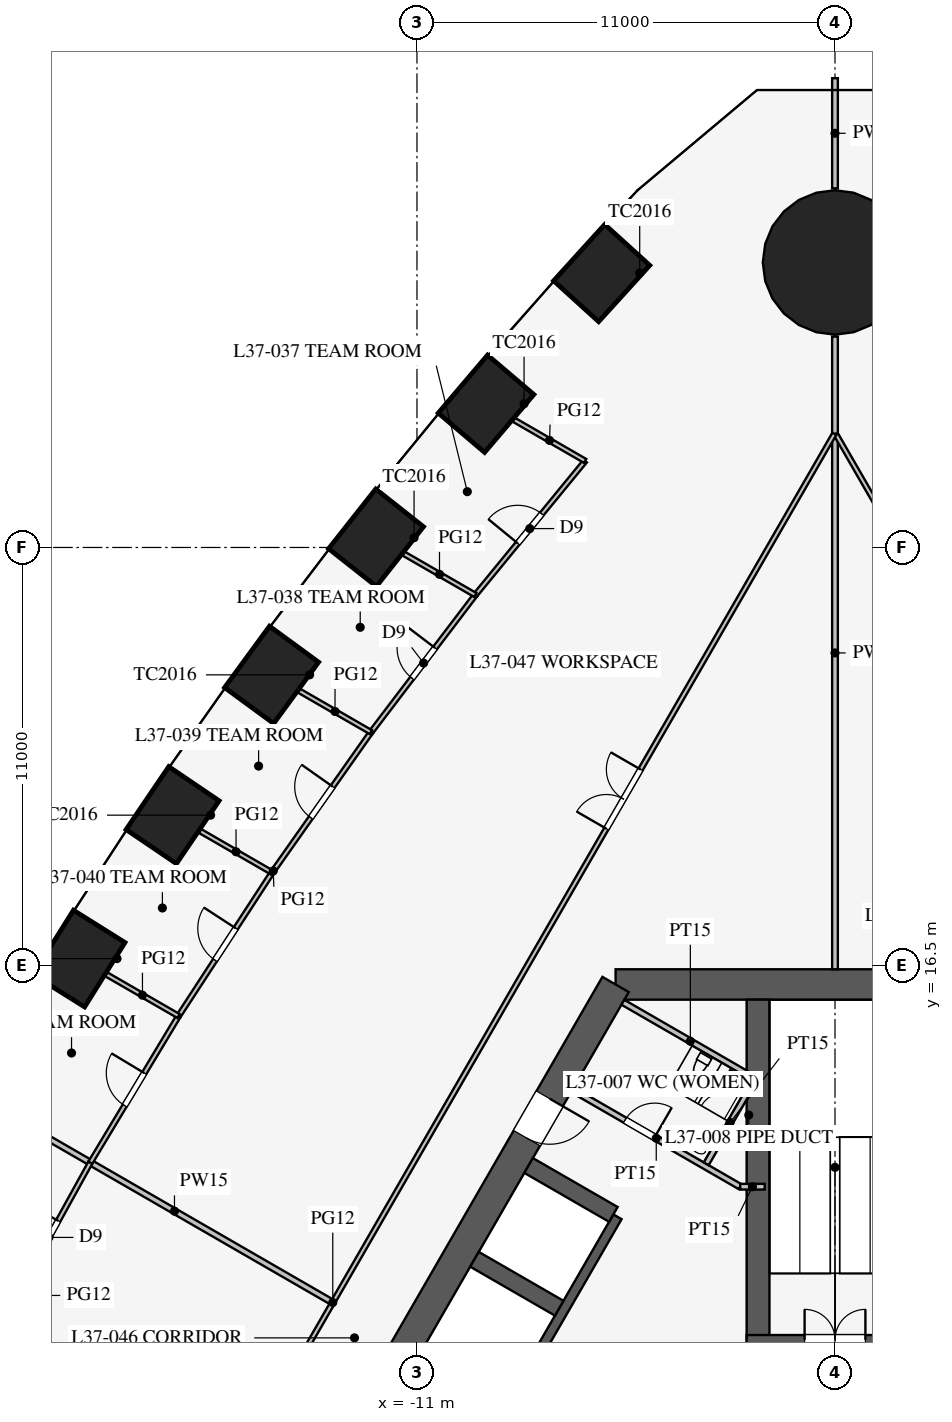
"""IFC4 building model, lengths in metres.
Left out: names, types, materials, properties, quantities, classifications, styles, units other than length and angle.
Written with IfcOpenShell. Run it as: python <this file> out.ifc"""

import sys

from ifc_helpers import new_model, si_unit, direction, frame, frame_2d, origin, origin_2d, place, context, subcontext, project, spatial, rectangle, circle, extrude, element, fill, save


model = new_model("IFC4")
c1 = context("Model", 3, precision=1e-05, world=origin(), true_north=direction((0.0, 1.0)))
c2 = subcontext(c1, "Body", "Model", "MODEL_VIEW")
j1 = project(units=[si_unit("LENGTHUNIT", "METRE"), si_unit("PLANEANGLEUNIT", "RADIAN")], contexts=[c1])
p1 = place(None, origin())
s1 = spatial("IfcSite", under=j1, at=p1, CompositionType="ELEMENT")
p2 = place(p1, origin())
s2 = spatial("IfcBuilding", under=s1, at=p2, CompositionType="ELEMENT")
p3 = place(p2, frame((0.0, 0.0, 161.9)))
s3 = spatial("IfcBuildingStorey", under=s2, at=p3, CompositionType="ELEMENT", Elevation=161.9)
for number, where, z_axis, x_axis in (
    (1, (-6.139, 34.721, 0.0), (0.0, 0.0, 1.0), (-0.672, -0.74, 0.0)),
    (2, (-9.182, 31.282, 0.0), (0.0, 0.0, 1.0), (-0.648, -0.762, 0.0)),
    (3, (-12.077, 27.757, 0.0), (0.0, 0.0, 1.0), (-0.62, -0.785, 0.0)),
    (4, (-14.825, 24.148, 0.0), (0.0, 0.0, 1.0), (-0.591, -0.807, 0.0)),
    (5, (-17.43, 20.456, 0.0), (0.0, 0.0, 1.0), (-0.561, -0.828, 0.0)),
    (6, (-19.893, 16.681, 0.0), (0.0, 0.0, 1.0), (-0.531, -0.847, 0.0)),
):
    element("IfcColumn", number, at=place(p3, frame(where, z_axis=z_axis, x_axis=x_axis)), inside=s3, PredefinedType="COLUMN", context=c2, shape_type="SweptSolid", body=[
        extrude(rectangle(XDim=2.0, YDim=1.6, at=origin_2d()), origin(), (0.0, 0.0, 1.0), 4.2),
    ])
p4 = place(p3, frame((0.0, 35.0, 0.0), z_axis=(0.0, 0.0, 1.0), x_axis=(1.0, 0.0, 0.0)))
e7 = element("IfcColumn", 7, at=p4, inside=s3, PredefinedType="COLUMN", context=c2, shape_type="SweptSolid", body=[
    extrude(circle(Radius=1.9, at=origin_2d()), origin(), (0.0, 0.0, 1.0), 4.2),
])
p5 = place(p3, frame((5.773, 16.0, 0.0), z_axis=(0.0, 0.0, 1.0), x_axis=(-1.0, 0.0, 0.0)))
e8 = element("IfcWall", 8, at=p5, inside=s3, PredefinedType="SHEAR", context=c2, shape_type="SweptSolid", body=[
    extrude(rectangle(XDim=11.547, YDim=0.8, at=frame_2d((5.773, 0.0))), origin(), (0.0, 0.0, 1.0), 4.2),
])
p6 = place(p3, frame((-5.773, 16.0, 0.0), z_axis=(0.0, 0.0, 1.0), x_axis=(-0.500002442456, -0.866023993627, 0.0)))
e9 = element("IfcWall", 9, at=p6, inside=s3, PredefinedType="SHEAR", context=c2, shape_type="SweptSolid", body=[
    extrude(rectangle(XDim=21.939, YDim=0.8, at=frame_2d((10.97, 0.0))), origin(), (0.0, 0.0, 1.0), 4.2),
])
p7 = place(p6, frame((17.27, 0.0, 0.0)))
e10 = element("IfcOpeningElement", 10, at=p7, cuts=e9, PredefinedType="OPENING", context=c2, shape_type="SweptSolid", body=[
    extrude(rectangle(XDim=1.2, YDim=2.1, at=frame_2d((0.6, 1.05))), frame((0.0, 0.41, 0.0), z_axis=(0.0, -1.0, 0.0), x_axis=(1.0, 0.0, 0.0)), (0.0, 0.0, 1.0), 0.82),
])
p8 = place(p6, frame((3.47, 0.0, 0.0)))
e11 = element("IfcOpeningElement", 11, at=p8, cuts=e9, PredefinedType="OPENING", context=c2, shape_type="SweptSolid", body=[
    extrude(rectangle(XDim=1.2, YDim=2.1, at=frame_2d((0.6, 1.05))), frame((0.0, 0.41, 0.0), z_axis=(0.0, -1.0, 0.0), x_axis=(1.0, 0.0, 0.0)), (0.0, 0.0, 1.0), 0.82),
])
p9 = place(p3, frame((-5.724, 9.886, 0.0), z_axis=(0.0, 0.0, 1.0), x_axis=(-0.500001763848, -0.866024385424, 0.0)))
e12 = element("IfcWall", 12, at=p9, inside=s3, PredefinedType="SHEAR", context=c2, shape_type="SweptSolid", body=[
    extrude(rectangle(XDim=11.4, YDim=0.25, at=frame_2d((5.7, 0.0))), origin(), (0.0, 0.0, 1.0), 4.2),
])
p10 = place(p9, frame((6.525, 0.0, 0.0)))
e13 = element("IfcOpeningElement", 13, at=p10, cuts=e12, PredefinedType="OPENING", context=c2, shape_type="SweptSolid", body=[
    extrude(rectangle(XDim=1.2, YDim=2.2, at=frame_2d((0.6, 1.1))), frame((0.0, 0.135, 0.0), z_axis=(0.0, -1.0, 0.0), x_axis=(1.0, 0.0, 0.0)), (0.0, 0.0, 1.0), 0.27),
])
p11 = place(p9, frame((9.375, 0.0, 0.0)))
e14 = element("IfcOpeningElement", 14, at=p11, cuts=e12, PredefinedType="OPENING", context=c2, shape_type="SweptSolid", body=[
    extrude(rectangle(XDim=1.2, YDim=2.2, at=frame_2d((0.6, 1.1))), frame((0.0, 0.135, 0.0), z_axis=(0.0, -1.0, 0.0), x_axis=(1.0, 0.0, 0.0)), (0.0, 0.0, 1.0), 0.27),
])
p12 = place(p3, frame((-5.832, 9.949, 0.0), z_axis=(0.0, 0.0, 1.0), x_axis=(-0.866029291668, 0.499993265928, 0.0)))
e15 = element("IfcWall", 15, at=p12, inside=s3, PredefinedType="SHEAR", context=c2, shape_type="SweptSolid", body=[
    extrude(rectangle(XDim=2.575, YDim=0.45, at=frame_2d((1.288, 0.0))), origin(), (0.0, 0.0, 1.0), 4.2),
])
p13 = place(p3, frame((-7.257, 7.481, 0.0), z_axis=(0.0, 0.0, 1.0), x_axis=(-0.866046643894, 0.499963209246, 0.0)))
e16 = element("IfcWall", 16, at=p13, inside=s3, PredefinedType="SHEAR", context=c2, shape_type="SweptSolid", body=[
    extrude(rectangle(XDim=2.575, YDim=0.45, at=frame_2d((1.288, 0.0))), origin(), (0.0, 0.0, 1.0), 4.2),
])
p14 = place(p3, frame((-2.025, 6.525, 0.0), z_axis=(0.0, 0.0, 1.0), x_axis=(0.0, 1.0, 0.0)))
e17 = element("IfcWall", 17, at=p14, inside=s3, PredefinedType="SHEAR", context=c2, shape_type="SweptSolid", body=[
    extrude(rectangle(XDim=9.075, YDim=0.6, at=frame_2d((4.538, 0.0))), origin(), (0.0, 0.0, 1.0), 4.2),
])
p15 = place(p3, frame((2.325, 6.65, 0.0), z_axis=(0.0, 0.0, 1.0), x_axis=(-1.0, 0.0, 0.0)))
e18 = element("IfcWall", 18, at=p15, inside=s3, PredefinedType="SHEAR", context=c2, shape_type="SweptSolid", body=[
    extrude(rectangle(XDim=4.65, YDim=0.25, at=frame_2d((2.325, 0.0))), origin(), (0.0, 0.0, 1.0), 4.2),
])
p16 = place(p15, frame((1.525, 0.0, 0.0)))
e19 = element("IfcOpeningElement", 19, at=p16, cuts=e18, PredefinedType="OPENING", context=c2, shape_type="SweptSolid", body=[
    extrude(rectangle(XDim=1.6, YDim=2.1, at=frame_2d((0.8, 1.05))), frame((0.0, 0.135, 0.0), z_axis=(0.0, -1.0, 0.0), x_axis=(1.0, 0.0, 0.0)), (0.0, 0.0, 1.0), 0.27),
])
p17 = place(p3, frame((-2.495, 10.678, 0.0), z_axis=(0.0, 0.0, 1.0), x_axis=(-0.86602216432, 0.500005610874, 0.0)))
e20 = element("IfcWall", 20, at=p17, inside=s3, PredefinedType="PARTITIONING", context=c2, shape_type="SweptSolid", body=[
    extrude(rectangle(XDim=5.1, YDim=0.15, at=frame_2d((2.55, 0.0))), origin(), (0.0, 0.0, 1.0), 4.0),
])
p18 = place(p17, frame((2.6, 0.0, 0.0)))
e21 = element("IfcOpeningElement", 21, at=p18, cuts=e20, PredefinedType="OPENING", context=c2, shape_type="SweptSolid", body=[
    extrude(rectangle(XDim=0.9, YDim=2.1, at=frame_2d((0.45, 1.05))), frame((0.0, 0.085, 0.0), z_axis=(0.0, -1.0, 0.0), x_axis=(1.0, 0.0, 0.0)), (0.0, 0.0, 1.0), 0.17),
])
p19 = place(p3, frame((-2.495, 10.678, 0.0), z_axis=(0.0, 0.0, 1.0), x_axis=(1.0, 0.0, 0.0)))
e22 = element("IfcWall", 22, at=p19, inside=s3, PredefinedType="PARTITIONING", context=c2, shape_type="SweptSolid", body=[
    extrude(rectangle(XDim=0.645, YDim=0.15, at=frame_2d((0.323, 0.0))), origin(), (0.0, 0.0, 1.0), 4.0),
])
p20 = place(p3, frame((-2.031, 13.482, 0.0), z_axis=(0.0, 0.0, 1.0), x_axis=(-0.866050731258, 0.499956128963, 0.0)))
e23 = element("IfcWall", 23, at=p20, inside=s3, PredefinedType="PARTITIONING", context=c2, shape_type="SweptSolid", body=[
    extrude(rectangle(XDim=4.1, YDim=0.15, at=frame_2d((2.05, 0.0))), origin(), (0.0, 0.0, 1.0), 4.0),
])
p21 = place(p3, frame((-3.389, 11.281, 0.0), z_axis=(0.0, 0.0, 1.0), x_axis=(0.499989096993, 0.866031698547, 0.0)))
e24 = element("IfcWall", 24, at=p21, inside=s3, PredefinedType="PARTITIONING", context=c2, shape_type="SweptSolid", body=[
    extrude(rectangle(XDim=2.51, YDim=0.15, at=frame_2d((1.255, 0.0))), origin(), (0.0, 0.0, 1.0), 4.0),
])
p22 = place(p3, frame((0.0, 16.4, 0.0), z_axis=(0.0, 0.0, 1.0), x_axis=(0.0, 1.0, 0.0)))
e25 = element("IfcWall", 25, at=p22, inside=s3, PredefinedType="PARTITIONING", context=c2, shape_type="SweptSolid", body=[
    extrude(rectangle(XDim=16.65, YDim=0.15, at=frame_2d((8.325, 0.0))), origin(), (0.0, 0.0, 1.0), 2.3),
])
p23 = place(p3, frame((0.0, 36.95, 0.0), z_axis=(0.0, 0.0, 1.0), x_axis=(0.0, 1.0, 0.0)))
e26 = element("IfcWall", 26, at=p23, inside=s3, PredefinedType="PARTITIONING", context=c2, shape_type="SweptSolid", body=[
    extrude(rectangle(XDim=2.899, YDim=0.15, at=frame_2d((1.45, 0.0))), origin(), (0.0, 0.0, 1.0), 2.3),
])
p24 = place(p3, frame((26.415, -15.231, 0.0), z_axis=(0.0, 0.0, 1.0), x_axis=(-0.50000091641, 0.866024874695, 0.0)))
e27 = element("IfcWall", 27, at=p24, inside=s3, PredefinedType="PARTITIONING", context=c2, shape_type="SweptSolid", body=[
    extrude(rectangle(XDim=52.796, YDim=0.12, at=frame_2d((26.398, 0.0))), origin(), (0.0, 0.0, 1.0), 2.9),
])
p25 = place(p24, frame((10.2, 0.0, 0.15)))
e28 = element("IfcOpeningElement", 28, at=p25, cuts=e27, PredefinedType="OPENING", context=c2, shape_type="SweptSolid", body=[
    extrude(rectangle(XDim=1.8, YDim=2.1, at=frame_2d((0.9, 1.05))), frame((0.0, 0.07, 0.0), z_axis=(0.0, -1.0, 0.0), x_axis=(1.0, 0.0, 0.0)), (0.0, 0.0, 1.0), 0.14),
])
p26 = place(p24, frame((40.8, 0.0, 0.15)))
e29 = element("IfcOpeningElement", 29, at=p26, cuts=e27, PredefinedType="OPENING", context=c2, shape_type="SweptSolid", body=[
    extrude(rectangle(XDim=1.8, YDim=2.1, at=frame_2d((0.9, 1.05))), frame((0.0, 0.07, 0.0), z_axis=(0.0, -1.0, 0.0), x_axis=(1.0, 0.0, 0.0)), (0.0, 0.0, 1.0), 0.14),
])
p27 = place(p3, frame((-13.268, 7.66, 0.0), z_axis=(0.0, 0.0, 1.0), x_axis=(-0.866013963754, 0.500019814191, 0.0)))
e30 = element("IfcWall", 30, at=p27, inside=s3, PredefinedType="PARTITIONING", context=c2, shape_type="SweptSolid", body=[
    extrude(rectangle(XDim=9.5, YDim=0.15, at=frame_2d((4.75, 0.0))), origin(), (0.0, 0.0, 1.0), 2.8),
])
p28 = place(p3, frame((-0.016, 30.491, 0.0), z_axis=(0.0, 0.0, 1.0), x_axis=(-0.50000091641, -0.866024874695, 0.0)))
e31 = element("IfcWall", 31, at=p28, inside=s3, PredefinedType="PARTITIONING", context=c2, shape_type="SweptSolid", body=[
    extrude(rectangle(XDim=52.796, YDim=0.12, at=frame_2d((26.398, 0.0))), origin(), (0.0, 0.0, 1.0), 2.9),
])
p29 = place(p28, frame((10.2, 0.0, 0.15)))
e32 = element("IfcOpeningElement", 32, at=p29, cuts=e31, PredefinedType="OPENING", context=c2, shape_type="SweptSolid", body=[
    extrude(rectangle(XDim=1.8, YDim=2.1, at=frame_2d((0.9, 1.05))), frame((0.0, 0.07, 0.0), z_axis=(0.0, -1.0, 0.0), x_axis=(1.0, 0.0, 0.0)), (0.0, 0.0, 1.0), 0.14),
])
p30 = place(p28, frame((40.8, 0.0, 0.15)))
e33 = element("IfcOpeningElement", 33, at=p30, cuts=e31, PredefinedType="OPENING", context=c2, shape_type="SweptSolid", body=[
    extrude(rectangle(XDim=1.8, YDim=2.1, at=frame_2d((0.9, 1.05))), frame((0.0, 0.07, 0.0), z_axis=(0.0, -1.0, 0.0), x_axis=(1.0, 0.0, 0.0)), (0.0, 0.0, 1.0), 0.14),
])
p31 = place(p3, frame((-19.594, 11.312, 0.0), z_axis=(0.0, 0.0, 1.0), x_axis=(-0.484315883017, -0.87489320803, 0.0)))
e34 = element("IfcWall", 34, at=p31, inside=s3, PredefinedType="PARTITIONING", context=c2, shape_type="SweptSolid", body=[
    extrude(rectangle(XDim=4.5, YDim=0.12, at=frame_2d((2.25, 0.0))), origin(), (0.0, 0.0, 1.0), 2.9),
])
p32 = place(p31, frame((1.75, 0.0, 0.15)))
e35 = element("IfcOpeningElement", 35, at=p32, cuts=e34, PredefinedType="OPENING", context=c2, shape_type="SweptSolid", body=[
    extrude(rectangle(XDim=1.0, YDim=2.1, at=frame_2d((0.5, 1.05))), frame((0.0, 0.07, 0.0), z_axis=(0.0, -1.0, 0.0), x_axis=(1.0, 0.0, 0.0)), (0.0, 0.0, 1.0), 0.14),
])
p33 = place(p3, frame((-12.21, 22.638, 0.0), z_axis=(0.0, 0.0, 1.0), x_axis=(-0.575987178736, -0.817458726745, 0.0)))
e36 = element("IfcWall", 36, at=p33, inside=s3, PredefinedType="PARTITIONING", context=c2, shape_type="SweptSolid", body=[
    extrude(rectangle(XDim=4.518, YDim=0.12, at=frame_2d((2.259, 0.0))), origin(), (0.0, 0.0, 1.0), 2.9),
])
p34 = place(p33, frame((1.75, 0.0, 0.15)))
e37 = element("IfcOpeningElement", 37, at=p34, cuts=e36, PredefinedType="OPENING", context=c2, shape_type="SweptSolid", body=[
    extrude(rectangle(XDim=1.0, YDim=2.1, at=frame_2d((0.5, 1.05))), frame((0.0, 0.07, 0.0), z_axis=(0.0, -1.0, 0.0), x_axis=(1.0, 0.0, 0.0)), (0.0, 0.0, 1.0), 0.14),
])
p35 = place(p3, frame((-9.464, 26.249, 0.0), z_axis=(0.0, 0.0, 1.0), x_axis=(-0.605248368565, -0.796036690329, 0.0)))
e38 = element("IfcWall", 38, at=p35, inside=s3, PredefinedType="PARTITIONING", context=c2, shape_type="SweptSolid", body=[
    extrude(rectangle(XDim=4.536, YDim=0.12, at=frame_2d((2.268, 0.0))), origin(), (0.0, 0.0, 1.0), 2.9),
])
p36 = place(p35, frame((1.75, 0.0, 0.15)))
e39 = element("IfcOpeningElement", 39, at=p36, cuts=e38, PredefinedType="OPENING", context=c2, shape_type="SweptSolid", body=[
    extrude(rectangle(XDim=1.0, YDim=2.1, at=frame_2d((0.5, 1.05))), frame((0.0, 0.07, 0.0), z_axis=(0.0, -1.0, 0.0), x_axis=(1.0, 0.0, 0.0)), (0.0, 0.0, 1.0), 0.14),
])
p37 = place(p3, frame((-6.573, 29.776, 0.0), z_axis=(0.0, 0.0, 1.0), x_axis=(-0.633843962561, -0.773460943503, 0.0)))
e40 = element("IfcWall", 40, at=p37, inside=s3, PredefinedType="PARTITIONING", context=c2, shape_type="SweptSolid", body=[
    extrude(rectangle(XDim=4.561, YDim=0.12, at=frame_2d((2.28, 0.0))), origin(), (0.0, 0.0, 1.0), 2.9),
])
p38 = place(p37, frame((1.8, 0.0, 0.15)))
e41 = element("IfcOpeningElement", 41, at=p38, cuts=e40, PredefinedType="OPENING", context=c2, shape_type="SweptSolid", body=[
    extrude(rectangle(XDim=1.0, YDim=2.1, at=frame_2d((0.5, 1.05))), frame((0.0, 0.07, 0.0), z_axis=(0.0, -1.0, 0.0), x_axis=(1.0, 0.0, 0.0)), (0.0, 0.0, 1.0), 0.14),
])
p39 = place(p3, frame((-17.273, 15.169, 0.0), z_axis=(0.0, 0.0, 1.0), x_axis=(-0.515524404457, -0.856874896592, 0.0)))
e42 = element("IfcWall", 42, at=p39, inside=s3, PredefinedType="PARTITIONING", context=c2, shape_type="SweptSolid", body=[
    extrude(rectangle(XDim=4.501, YDim=0.12, at=frame_2d((2.25, 0.0))), origin(), (0.0, 0.0, 1.0), 2.9),
])
p40 = place(p39, frame((1.75, 0.0, 0.15)))
e43 = element("IfcOpeningElement", 43, at=p40, cuts=e42, PredefinedType="OPENING", context=c2, shape_type="SweptSolid", body=[
    extrude(rectangle(XDim=1.0, YDim=2.1, at=frame_2d((0.5, 1.05))), frame((0.0, 0.07, 0.0), z_axis=(0.0, -1.0, 0.0), x_axis=(1.0, 0.0, 0.0)), (0.0, 0.0, 1.0), 0.14),
])
p41 = place(p3, frame((-14.812, 18.944, 0.0), z_axis=(0.0, 0.0, 1.0), x_axis=(-0.546094247499, -0.837723744948, 0.0)))
e44 = element("IfcWall", 44, at=p41, inside=s3, PredefinedType="PARTITIONING", context=c2, shape_type="SweptSolid", body=[
    extrude(rectangle(XDim=4.506, YDim=0.12, at=frame_2d((2.253, 0.0))), origin(), (0.0, 0.0, 1.0), 2.9),
])
p42 = place(p41, frame((1.75, 0.0, 0.15)))
e45 = element("IfcOpeningElement", 45, at=p42, cuts=e44, PredefinedType="OPENING", context=c2, shape_type="SweptSolid", body=[
    extrude(rectangle(XDim=1.0, YDim=2.1, at=frame_2d((0.5, 1.05))), frame((0.0, 0.07, 0.0), z_axis=(0.0, -1.0, 0.0), x_axis=(1.0, 0.0, 0.0)), (0.0, 0.0, 1.0), 0.14),
])
p43 = place(p3, frame((-12.21, 22.638, 0.0), z_axis=(0.0, 0.0, 1.0), x_axis=(-0.866006986733, 0.500031897912, 0.0)))
e46 = element("IfcWall", 46, at=p43, inside=s3, PredefinedType="PARTITIONING", context=c2, shape_type="SweptSolid", body=[
    extrude(rectangle(XDim=2.185, YDim=0.12, at=frame_2d((1.093, 0.0))), origin(), (0.0, 0.0, 1.0), 2.6),
])
p44 = place(p3, frame((-9.464, 26.249, 0.0), z_axis=(0.0, 0.0, 1.0), x_axis=(-0.866054922749, 0.499948868167, 0.0)))
e47 = element("IfcWall", 47, at=p44, inside=s3, PredefinedType="PARTITIONING", context=c2, shape_type="SweptSolid", body=[
    extrude(rectangle(XDim=2.178, YDim=0.12, at=frame_2d((1.089, 0.0))), origin(), (0.0, 0.0, 1.0), 2.8),
])
p45 = place(p3, frame((-6.573, 29.776, 0.0), z_axis=(0.0, 0.0, 1.0), x_axis=(-0.866044951753, 0.499966140396, 0.0)))
e48 = element("IfcWall", 48, at=p45, inside=s3, PredefinedType="PARTITIONING", context=c2, shape_type="SweptSolid", body=[
    extrude(rectangle(XDim=2.168, YDim=0.12, at=frame_2d((1.084, 0.0))), origin(), (0.0, 0.0, 1.0), 2.9),
])
p46 = place(p3, frame((-17.273, 15.169, 0.0), z_axis=(0.0, 0.0, 1.0), x_axis=(-0.866050320478, 0.499956840538, 0.0)))
e49 = element("IfcWall", 49, at=p46, inside=s3, PredefinedType="PARTITIONING", context=c2, shape_type="SweptSolid", body=[
    extrude(rectangle(XDim=2.194, YDim=0.12, at=frame_2d((1.097, 0.0))), origin(), (0.0, 0.0, 1.0), 2.8),
])
p47 = place(p3, frame((-14.812, 18.944, 0.0), z_axis=(0.0, 0.0, 1.0), x_axis=(-0.866005567398, 0.500034356056, 0.0)))
e50 = element("IfcWall", 50, at=p47, inside=s3, PredefinedType="PARTITIONING", context=c2, shape_type="SweptSolid", body=[
    extrude(rectangle(XDim=2.191, YDim=0.12, at=frame_2d((1.095, 0.0))), origin(), (0.0, 0.0, 1.0), 2.9),
])
p48 = place(p18, frame((0.9, 0.0, 0.0), z_axis=(0.0, 0.0, 1.0), x_axis=(-1.0, 0.0, 0.0)))
e51 = element("IfcDoor", 51, at=p48, inside=s3, OperationType="SINGLE_SWING_RIGHT", PredefinedType="DOOR", context=c2, shape_type="SweptSolid", body=[
    extrude(rectangle(XDim=0.9, YDim=2.1, at=frame_2d((0.45, 1.05))), frame((0.0, 0.025, 0.0), z_axis=(0.0, -1.0, 0.0), x_axis=(1.0, 0.0, 0.0)), (0.0, 0.0, 1.0), 0.05),
])
fill(e21, e51)
p49 = place(p16, frame((1.6, 0.0, 0.0), z_axis=(0.0, 0.0, 1.0), x_axis=(-1.0, 0.0, 0.0)))
e52 = element("IfcDoor", 52, at=p49, inside=s3, OperationType="DOUBLE_DOOR_SINGLE_SWING", PredefinedType="DOOR", context=c2, shape_type="SweptSolid", body=[
    extrude(rectangle(XDim=1.6, YDim=2.1, at=frame_2d((0.8, 1.05))), frame((0.0, 0.025, 0.0), z_axis=(0.0, -1.0, 0.0), x_axis=(1.0, 0.0, 0.0)), (0.0, 0.0, 1.0), 0.05),
])
fill(e19, e52)
p50 = place(p8, origin())
e53 = element("IfcDoor", 53, at=p50, inside=s3, OperationType="SINGLE_SWING_LEFT", PredefinedType="DOOR", context=c2, shape_type="SweptSolid", body=[
    extrude(rectangle(XDim=1.2, YDim=2.1, at=frame_2d((0.6, 1.05))), frame((0.0, 0.025, 0.0), z_axis=(0.0, -1.0, 0.0), x_axis=(1.0, 0.0, 0.0)), (0.0, 0.0, 1.0), 0.05),
])
fill(e11, e53)
p51 = place(p38, frame((1.0, 0.0, 0.0), z_axis=(0.0, 0.0, 1.0), x_axis=(-1.0, 0.0, 0.0)))
e54 = element("IfcDoor", 54, at=p51, inside=s3, OperationType="SINGLE_SWING_LEFT", PredefinedType="DOOR", context=c2, shape_type="SweptSolid", body=[
    extrude(rectangle(XDim=1.0, YDim=2.1, at=frame_2d((0.5, 1.05))), frame((0.0, 0.025, 0.0), z_axis=(0.0, -1.0, 0.0), x_axis=(1.0, 0.0, 0.0)), (0.0, 0.0, 1.0), 0.05),
])
fill(e41, e54)
p52 = place(p36, frame((1.0, 0.0, 0.0), z_axis=(0.0, 0.0, 1.0), x_axis=(-1.0, 0.0, 0.0)))
e55 = element("IfcDoor", 55, at=p52, inside=s3, OperationType="SINGLE_SWING_RIGHT", PredefinedType="DOOR", context=c2, shape_type="SweptSolid", body=[
    extrude(rectangle(XDim=1.0, YDim=2.1, at=frame_2d((0.5, 1.05))), frame((0.0, 0.025, 0.0), z_axis=(0.0, -1.0, 0.0), x_axis=(1.0, 0.0, 0.0)), (0.0, 0.0, 1.0), 0.05),
])
fill(e39, e55)
p53 = place(p34, frame((1.0, 0.0, 0.0), z_axis=(0.0, 0.0, 1.0), x_axis=(-1.0, 0.0, 0.0)))
e56 = element("IfcDoor", 56, at=p53, inside=s3, OperationType="SINGLE_SWING_RIGHT", PredefinedType="DOOR", context=c2, shape_type="SweptSolid", body=[
    extrude(rectangle(XDim=1.0, YDim=2.1, at=frame_2d((0.5, 1.05))), frame((0.0, 0.025, 0.0), z_axis=(0.0, -1.0, 0.0), x_axis=(1.0, 0.0, 0.0)), (0.0, 0.0, 1.0), 0.05),
])
fill(e37, e56)
p54 = place(p42, frame((1.0, 0.0, 0.0), z_axis=(0.0, 0.0, 1.0), x_axis=(-1.0, 0.0, 0.0)))
e57 = element("IfcDoor", 57, at=p54, inside=s3, OperationType="SINGLE_SWING_RIGHT", PredefinedType="DOOR", context=c2, shape_type="SweptSolid", body=[
    extrude(rectangle(XDim=1.0, YDim=2.1, at=frame_2d((0.5, 1.05))), frame((0.0, 0.025, 0.0), z_axis=(0.0, -1.0, 0.0), x_axis=(1.0, 0.0, 0.0)), (0.0, 0.0, 1.0), 0.05),
])
fill(e45, e57)
p55 = place(p40, frame((1.0, 0.0, 0.0), z_axis=(0.0, 0.0, 1.0), x_axis=(-1.0, 0.0, 0.0)))
e58 = element("IfcDoor", 58, at=p55, inside=s3, OperationType="SINGLE_SWING_RIGHT", PredefinedType="DOOR", context=c2, shape_type="SweptSolid", body=[
    extrude(rectangle(XDim=1.0, YDim=2.1, at=frame_2d((0.5, 1.05))), frame((0.0, 0.025, 0.0), z_axis=(0.0, -1.0, 0.0), x_axis=(1.0, 0.0, 0.0)), (0.0, 0.0, 1.0), 0.05),
])
fill(e43, e58)
p56 = place(p32, frame((1.0, 0.0, 0.0), z_axis=(0.0, 0.0, 1.0), x_axis=(-1.0, 0.0, 0.0)))
e59 = element("IfcDoor", 59, at=p56, inside=s3, OperationType="SINGLE_SWING_RIGHT", PredefinedType="DOOR", context=c2, shape_type="SweptSolid", body=[
    extrude(rectangle(XDim=1.0, YDim=2.1, at=frame_2d((0.5, 1.05))), frame((0.0, 0.025, 0.0), z_axis=(0.0, -1.0, 0.0), x_axis=(1.0, 0.0, 0.0)), (0.0, 0.0, 1.0), 0.05),
])
fill(e35, e59)
p57 = place(p29, frame((1.8, 0.0, 0.0), z_axis=(0.0, 0.0, 1.0), x_axis=(-1.0, 0.0, 0.0)))
e60 = element("IfcDoor", 60, at=p57, inside=s3, OperationType="DOUBLE_DOOR_SINGLE_SWING", PredefinedType="DOOR", context=c2, shape_type="SweptSolid", body=[
    extrude(rectangle(XDim=1.8, YDim=2.1, at=frame_2d((0.9, 1.05))), frame((0.0, 0.025, 0.0), z_axis=(0.0, -1.0, 0.0), x_axis=(1.0, 0.0, 0.0)), (0.0, 0.0, 1.0), 0.05),
])
fill(e32, e60)
save(model, sys.argv[1])
